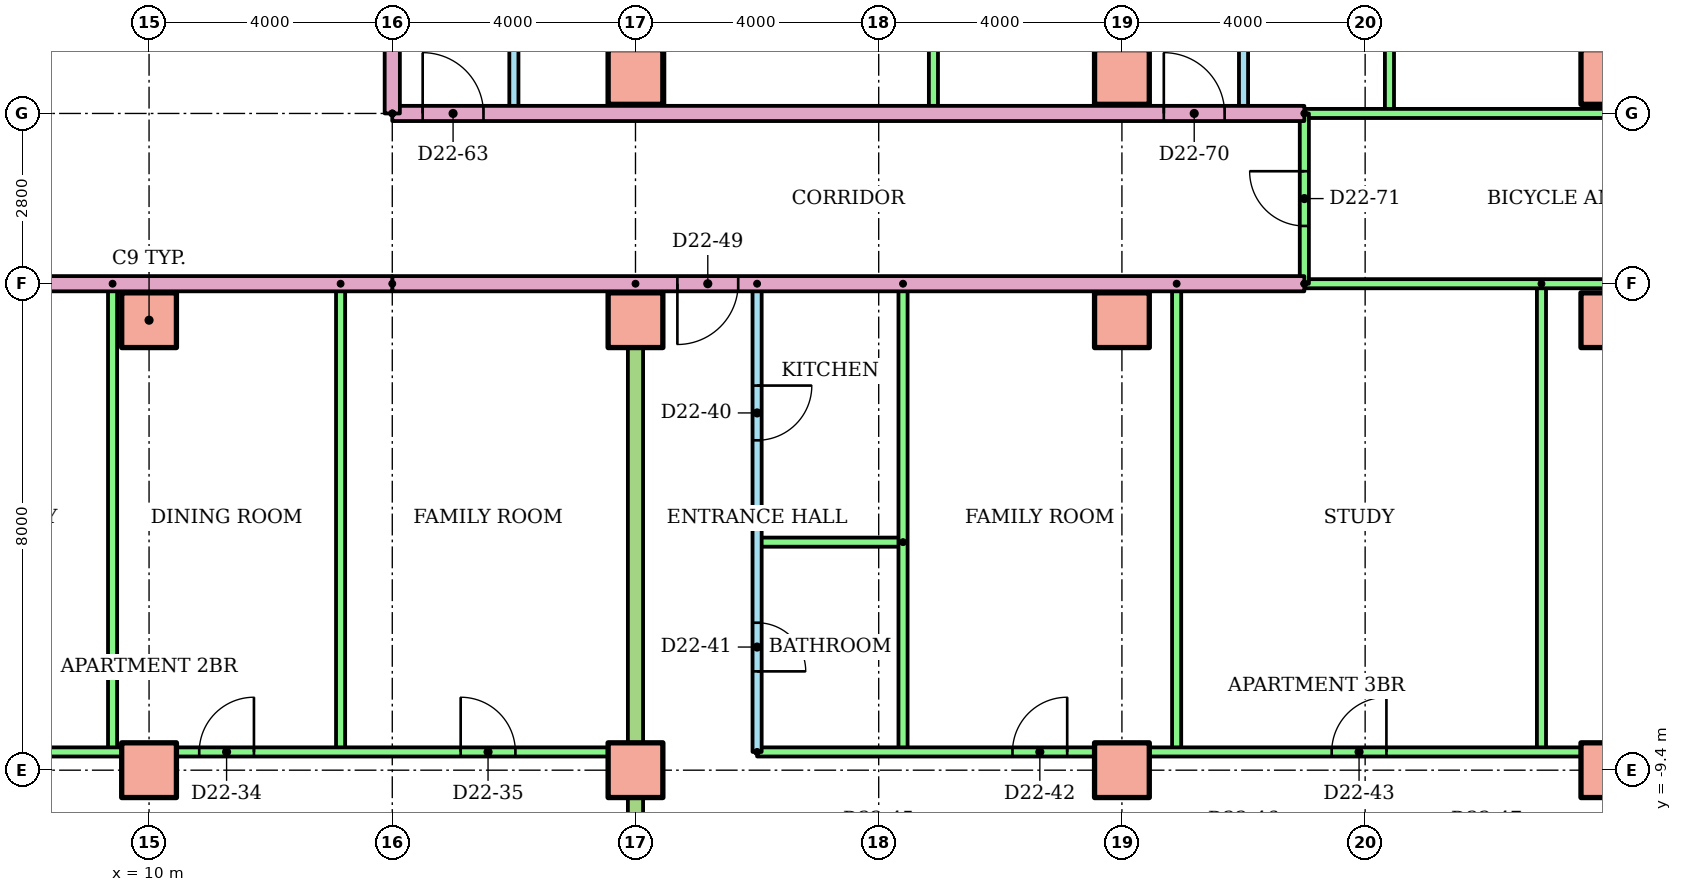
"""IFC4 building model, lengths in metres.
Left out: names, types, materials, properties, quantities, classifications, styles, units other than length and angle.
Written with IfcOpenShell. Run it as: python <this file> out.ifc"""

import sys

from ifc_helpers import new_model, si_unit, direction, frame, frame_2d, origin, origin_2d, place, context, subcontext, project, spatial, rectangle, extrude, element, fill, save


model = new_model("IFC4")
c1 = context("Model", 3, precision=1e-05, world=origin(), true_north=direction((0.0, 1.0)))
c2 = subcontext(c1, "Body", "Model", "MODEL_VIEW")
j1 = project(units=[si_unit("LENGTHUNIT", "METRE"), si_unit("PLANEANGLEUNIT", "RADIAN")], contexts=[c1])
p1 = place(None, origin())
s1 = spatial("IfcSite", under=j1, at=p1, CompositionType="ELEMENT")
p2 = place(p1, origin())
s2 = spatial("IfcBuilding", under=s1, at=p2, CompositionType="ELEMENT")
p3 = place(p2, frame((0.0, 0.0, 87.1)))
s3 = spatial("IfcBuildingStorey", under=s2, at=p3, CompositionType="ELEMENT", Elevation=87.1)
for number, where in (
    (1, (10.0, -9.4, 0.0)),
    (2, (18.0, -9.4, 0.0)),
    (3, (26.0, -9.4, 0.0)),
    (4, (34.0, -9.4, 0.0)),
    (5, (10.0, -2.0, 0.0)),
    (6, (18.0, -2.0, 0.0)),
    (7, (26.0, -2.0, 0.0)),
    (8, (34.0, -2.0, 0.0)),
    (9, (18.0, 2.0, 0.0)),
    (10, (26.0, 2.0, 0.0)),
    (11, (34.0, 2.0, 0.0)),
):
    element("IfcColumn", number, at=place(p3, frame(where)), inside=s3, PredefinedType="COLUMN", context=c2, shape_type="SweptSolid", body=[
        extrude(rectangle(XDim=0.9, YDim=0.9, at=origin_2d()), origin(), (0.0, 0.0, 1.0), 3.2),
    ])
for number, where, z_axis, x_axis in (
    (12, (9.4, -1.4, 0.0), (0.0, 0.0, 1.0), (0.0, -1.0, 0.0)),
    (13, (13.15, -1.4, 0.0), (0.0, 0.0, 1.0), (0.0, -1.0, 0.0)),
):
    element("IfcWall", number, at=place(p3, frame(where, z_axis=z_axis, x_axis=x_axis)), inside=s3, PredefinedType="PARTITIONING", context=c2, shape_type="SweptSolid", body=[
        extrude(rectangle(XDim=7.7, YDim=0.15, at=frame_2d((3.85, 0.0))), origin(), (0.0, 0.0, 1.0), 2.4),
    ])
p4 = place(p3, frame((4.0, -9.1, 0.0)))
e14 = element("IfcWall", 14, at=p4, inside=s3, PredefinedType="PARTITIONING", context=c2, shape_type="SweptSolid", body=[
    extrude(rectangle(XDim=14.0, YDim=0.15, at=frame_2d((7.0, 0.0))), origin(), (0.0, 0.0, 1.0), 2.4),
])
p5 = place(p4, frame((3.45, 0.0, 0.0)))
e15 = element("IfcOpeningElement", 15, at=p5, cuts=e14, PredefinedType="OPENING", context=c2, shape_type="SweptSolid", body=[
    extrude(rectangle(XDim=0.9, YDim=2.1, at=frame_2d((0.45, 1.05))), frame((0.0, 0.085, 0.0), z_axis=(0.0, -1.0, 0.0), x_axis=(1.0, 0.0, 0.0)), (0.0, 0.0, 1.0), 0.17),
])
p6 = place(p4, frame((6.825, 0.0, 0.0)))
e16 = element("IfcOpeningElement", 16, at=p6, cuts=e14, PredefinedType="OPENING", context=c2, shape_type="SweptSolid", body=[
    extrude(rectangle(XDim=0.9, YDim=2.1, at=frame_2d((0.45, 1.05))), frame((0.0, 0.085, 0.0), z_axis=(0.0, -1.0, 0.0), x_axis=(1.0, 0.0, 0.0)), (0.0, 0.0, 1.0), 0.17),
])
p7 = place(p4, frame((11.125, 0.0, 0.0)))
e17 = element("IfcOpeningElement", 17, at=p7, cuts=e14, PredefinedType="OPENING", context=c2, shape_type="SweptSolid", body=[
    extrude(rectangle(XDim=0.9, YDim=2.1, at=frame_2d((0.45, 1.05))), frame((0.0, 0.085, 0.0), z_axis=(0.0, -1.0, 0.0), x_axis=(1.0, 0.0, 0.0)), (0.0, 0.0, 1.0), 0.17),
])
p8 = place(p3, frame((20.0, -1.4, 0.0), z_axis=(0.0, 0.0, 1.0), x_axis=(0.0, -1.0, 0.0)))
e18 = element("IfcWall", 18, at=p8, inside=s3, PredefinedType="PARTITIONING", context=c2, shape_type="SweptSolid", body=[
    extrude(rectangle(XDim=7.7, YDim=0.15, at=frame_2d((3.85, 0.0))), origin(), (0.0, 0.0, 1.0), 2.4),
])
p9 = place(p8, frame((1.675, 0.0, 0.0)))
e19 = element("IfcOpeningElement", 19, at=p9, cuts=e18, PredefinedType="OPENING", context=c2, shape_type="SweptSolid", body=[
    extrude(rectangle(XDim=0.9, YDim=2.1, at=frame_2d((0.45, 1.05))), frame((0.0, 0.085, 0.0), z_axis=(0.0, -1.0, 0.0), x_axis=(1.0, 0.0, 0.0)), (0.0, 0.0, 1.0), 0.17),
])
p10 = place(p8, frame((5.575, 0.0, 0.0)))
e20 = element("IfcOpeningElement", 20, at=p10, cuts=e18, PredefinedType="OPENING", context=c2, shape_type="SweptSolid", body=[
    extrude(rectangle(XDim=0.8, YDim=2.1, at=frame_2d((0.4, 1.05))), frame((0.0, 0.085, 0.0), z_axis=(0.0, -1.0, 0.0), x_axis=(1.0, 0.0, 0.0)), (0.0, 0.0, 1.0), 0.17),
])
p11 = place(p3, frame((22.4, -5.65, 0.0), z_axis=(0.0, 0.0, 1.0), x_axis=(-1.0, 0.0, 0.0)))
e21 = element("IfcWall", 21, at=p11, inside=s3, PredefinedType="PARTITIONING", context=c2, shape_type="SweptSolid", body=[
    extrude(rectangle(XDim=2.4, YDim=0.15, at=frame_2d((1.2, 0.0))), origin(), (0.0, 0.0, 1.0), 2.4),
])
for number, where, z_axis, x_axis in (
    (22, (22.4, -1.4, 0.0), (0.0, 0.0, 1.0), (0.0, -1.0, 0.0)),
    (23, (26.9, -1.4, 0.0), (0.0, 0.0, 1.0), (0.0, -1.0, 0.0)),
    (24, (32.9, -1.4, 0.0), (0.0, 0.0, 1.0), (0.0, -1.0, 0.0)),
):
    element("IfcWall", number, at=place(p3, frame(where, z_axis=z_axis, x_axis=x_axis)), inside=s3, PredefinedType="PARTITIONING", context=c2, shape_type="SweptSolid", body=[
        extrude(rectangle(XDim=7.7, YDim=0.15, at=frame_2d((3.85, 0.0))), origin(), (0.0, 0.0, 1.0), 2.4),
    ])
p12 = place(p3, frame((20.0, -9.1, 0.0)))
e25 = element("IfcWall", 25, at=p12, inside=s3, PredefinedType="PARTITIONING", context=c2, shape_type="SweptSolid", body=[
    extrude(rectangle(XDim=20.62, YDim=0.15, at=frame_2d((10.31, 0.0))), origin(), (0.0, 0.0, 1.0), 2.4),
])
p13 = place(p12, frame((4.2, 0.0, 0.0)))
e26 = element("IfcOpeningElement", 26, at=p13, cuts=e25, PredefinedType="OPENING", context=c2, shape_type="SweptSolid", body=[
    extrude(rectangle(XDim=0.9, YDim=2.1, at=frame_2d((0.45, 1.05))), frame((0.0, 0.085, 0.0), z_axis=(0.0, -1.0, 0.0), x_axis=(1.0, 0.0, 0.0)), (0.0, 0.0, 1.0), 0.17),
])
p14 = place(p12, frame((9.45, 0.0, 0.0)))
e27 = element("IfcOpeningElement", 27, at=p14, cuts=e25, PredefinedType="OPENING", context=c2, shape_type="SweptSolid", body=[
    extrude(rectangle(XDim=0.9, YDim=2.1, at=frame_2d((0.45, 1.05))), frame((0.0, 0.085, 0.0), z_axis=(0.0, -1.0, 0.0), x_axis=(1.0, 0.0, 0.0)), (0.0, 0.0, 1.0), 0.17),
])
p15 = place(p12, frame((16.2, 0.0, 0.0)))
e28 = element("IfcOpeningElement", 28, at=p15, cuts=e25, PredefinedType="OPENING", context=c2, shape_type="SweptSolid", body=[
    extrude(rectangle(XDim=0.9, YDim=2.1, at=frame_2d((0.45, 1.05))), frame((0.0, 0.085, 0.0), z_axis=(0.0, -1.0, 0.0), x_axis=(1.0, 0.0, 0.0)), (0.0, 0.0, 1.0), 0.17),
])
p16 = place(p3, frame((18.0, -1.4, 0.0), z_axis=(0.0, 0.0, 1.0), x_axis=(0.0, -1.0, 0.0)))
e29 = element("IfcWall", 29, at=p16, inside=s3, PredefinedType="PARTITIONING", context=c2, shape_type="SweptSolid", body=[
    extrude(rectangle(XDim=14.81, YDim=0.25, at=frame_2d((7.405, 0.0))), origin(), (0.0, 0.0, 1.0), 2.4),
])
p17 = place(p3, frame((29.0, -1.4, 0.0), z_axis=(0.0, 0.0, 1.0), x_axis=(-1.0, 0.0, 0.0)))
e30 = element("IfcWall", 30, at=p17, inside=s3, PredefinedType="PARTITIONING", context=c2, shape_type="SweptSolid", body=[
    extrude(rectangle(XDim=15.0, YDim=0.25, at=frame_2d((7.5, 0.0))), origin(), (0.0, 0.0, 1.0), 2.4),
])
p18 = place(p17, frame((9.311, 0.0, 0.0)))
e31 = element("IfcOpeningElement", 31, at=p18, cuts=e30, PredefinedType="OPENING", context=c2, shape_type="SweptSolid", body=[
    extrude(rectangle(XDim=1.0, YDim=2.1, at=frame_2d((0.5, 1.05))), frame((0.0, 0.135, 0.0), z_axis=(0.0, -1.0, 0.0), x_axis=(1.0, 0.0, 0.0)), (0.0, 0.0, 1.0), 0.27),
])
p19 = place(p3, frame((40.62, -1.4, 0.0), z_axis=(0.0, 0.0, 1.0), x_axis=(-1.0, 0.0, 0.0)))
e32 = element("IfcWall", 32, at=p19, inside=s3, PredefinedType="PARTITIONING", context=c2, shape_type="SweptSolid", body=[
    extrude(rectangle(XDim=11.62, YDim=0.15, at=frame_2d((5.81, 0.0))), origin(), (0.0, 0.0, 1.0), 2.4),
])
p20 = place(p3, frame((16.0, 11.5, 0.0), z_axis=(0.0, 0.0, 1.0), x_axis=(0.0, -1.0, 0.0)))
e33 = element("IfcWall", 33, at=p20, inside=s3, PredefinedType="PARTITIONING", context=c2, shape_type="SweptSolid", body=[
    extrude(rectangle(XDim=10.1, YDim=0.15, at=frame_2d((5.05, 0.0))), origin(), (0.0, 0.0, 1.0), 2.4),
])
p21 = place(p20, frame((6.9, 0.0, 0.0)))
e34 = element("IfcOpeningElement", 34, at=p21, cuts=e33, PredefinedType="OPENING", context=c2, shape_type="SweptSolid", body=[
    extrude(rectangle(XDim=0.9, YDim=2.1, at=frame_2d((0.45, 1.05))), frame((0.0, 0.085, 0.0), z_axis=(0.0, -1.0, 0.0), x_axis=(1.0, 0.0, 0.0)), (0.0, 0.0, 1.0), 0.17),
])
p22 = place(p20, frame((1.9, 0.0, 0.0)))
e35 = element("IfcOpeningElement", 35, at=p22, cuts=e33, PredefinedType="OPENING", context=c2, shape_type="SweptSolid", body=[
    extrude(rectangle(XDim=0.8, YDim=2.1, at=frame_2d((0.4, 1.05))), frame((0.0, 0.085, 0.0), z_axis=(0.0, -1.0, 0.0), x_axis=(1.0, 0.0, 0.0)), (0.0, 0.0, 1.0), 0.17),
])
for number, where, z_axis, x_axis in (
    (36, (18.4, 11.5, 0.0), (0.0, 0.0, 1.0), (0.0, -1.0, 0.0)),
    (37, (22.9, 11.5, 0.0), (0.0, 0.0, 1.0), (0.0, -1.0, 0.0)),
):
    element("IfcWall", number, at=place(p3, frame(where, z_axis=z_axis, x_axis=x_axis)), inside=s3, PredefinedType="PARTITIONING", context=c2, shape_type="SweptSolid", body=[
        extrude(rectangle(XDim=10.1, YDim=0.15, at=frame_2d((5.05, 0.0))), origin(), (0.0, 0.0, 1.0), 2.4),
    ])
p23 = place(p3, frame((28.0, 11.5, 0.0), z_axis=(0.0, 0.0, 1.0), x_axis=(0.0, -1.0, 0.0)))
e38 = element("IfcWall", 38, at=p23, inside=s3, PredefinedType="PARTITIONING", context=c2, shape_type="SweptSolid", body=[
    extrude(rectangle(XDim=10.1, YDim=0.15, at=frame_2d((5.05, 0.0))), origin(), (0.0, 0.0, 1.0), 2.4),
])
p24 = place(p23, frame((6.9, 0.0, 0.0)))
e39 = element("IfcOpeningElement", 39, at=p24, cuts=e38, PredefinedType="OPENING", context=c2, shape_type="SweptSolid", body=[
    extrude(rectangle(XDim=0.9, YDim=2.1, at=frame_2d((0.45, 1.05))), frame((0.0, 0.085, 0.0), z_axis=(0.0, -1.0, 0.0), x_axis=(1.0, 0.0, 0.0)), (0.0, 0.0, 1.0), 0.17),
])
p25 = place(p23, frame((1.9, 0.0, 0.0)))
e40 = element("IfcOpeningElement", 40, at=p25, cuts=e38, PredefinedType="OPENING", context=c2, shape_type="SweptSolid", body=[
    extrude(rectangle(XDim=0.8, YDim=2.1, at=frame_2d((0.4, 1.05))), frame((0.0, 0.085, 0.0), z_axis=(0.0, -1.0, 0.0), x_axis=(1.0, 0.0, 0.0)), (0.0, 0.0, 1.0), 0.17),
])
p26 = place(p3, frame((30.4, 11.5, 0.0), z_axis=(0.0, 0.0, 1.0), x_axis=(0.0, -1.0, 0.0)))
e41 = element("IfcWall", 41, at=p26, inside=s3, PredefinedType="PARTITIONING", context=c2, shape_type="SweptSolid", body=[
    extrude(rectangle(XDim=10.1, YDim=0.15, at=frame_2d((5.05, 0.0))), origin(), (0.0, 0.0, 1.0), 2.4),
])
p27 = place(p3, frame((26.0, 18.621, 0.0), z_axis=(0.0, 0.0, 1.0), x_axis=(0.0, -1.0, 0.0)))
e42 = element("IfcWall", 42, at=p27, inside=s3, PredefinedType="PARTITIONING", context=c2, shape_type="SweptSolid", body=[
    extrude(rectangle(XDim=17.221, YDim=0.25, at=frame_2d((8.611, 0.0))), origin(), (0.0, 0.0, 1.0), 2.4),
])
p28 = place(p3, frame((14.0, 1.4, 0.0)))
e43 = element("IfcWall", 43, at=p28, inside=s3, PredefinedType="PARTITIONING", context=c2, shape_type="SweptSolid", body=[
    extrude(rectangle(XDim=15.0, YDim=0.25, at=frame_2d((7.5, 0.0))), origin(), (0.0, 0.0, 1.0), 2.4),
])
p29 = place(p28, frame((0.5, 0.0, 0.0)))
e44 = element("IfcOpeningElement", 44, at=p29, cuts=e43, PredefinedType="OPENING", context=c2, shape_type="SweptSolid", body=[
    extrude(rectangle(XDim=1.0, YDim=2.1, at=frame_2d((0.5, 1.05))), frame((0.0, 0.135, 0.0), z_axis=(0.0, -1.0, 0.0), x_axis=(1.0, 0.0, 0.0)), (0.0, 0.0, 1.0), 0.27),
])
p30 = place(p28, frame((12.689, 0.0, 0.0)))
e45 = element("IfcOpeningElement", 45, at=p30, cuts=e43, PredefinedType="OPENING", context=c2, shape_type="SweptSolid", body=[
    extrude(rectangle(XDim=1.0, YDim=2.1, at=frame_2d((0.5, 1.05))), frame((0.0, 0.135, 0.0), z_axis=(0.0, -1.0, 0.0), x_axis=(1.0, 0.0, 0.0)), (0.0, 0.0, 1.0), 0.27),
])
p31 = place(p3, frame((29.0, 1.4, 0.0)))
e46 = element("IfcWall", 46, at=p31, inside=s3, PredefinedType="PARTITIONING", context=c2, shape_type="SweptSolid", body=[
    extrude(rectangle(XDim=11.62, YDim=0.15, at=frame_2d((5.81, 0.0))), origin(), (0.0, 0.0, 1.0), 2.4),
])
p32 = place(p3, frame((29.0, -1.4, 0.0), z_axis=(0.0, 0.0, 1.0), x_axis=(0.0, 1.0, 0.0)))
e47 = element("IfcWall", 47, at=p32, inside=s3, PredefinedType="PARTITIONING", context=c2, shape_type="SweptSolid", body=[
    extrude(rectangle(XDim=2.8, YDim=0.15, at=frame_2d((1.4, 0.0))), origin(), (0.0, 0.0, 1.0), 2.4),
])
p33 = place(p32, frame((0.95, 0.0, 0.0)))
e48 = element("IfcOpeningElement", 48, at=p33, cuts=e47, PredefinedType="OPENING", context=c2, shape_type="SweptSolid", body=[
    extrude(rectangle(XDim=0.9, YDim=2.1, at=frame_2d((0.45, 1.05))), frame((0.0, 0.085, 0.0), z_axis=(0.0, -1.0, 0.0), x_axis=(1.0, 0.0, 0.0)), (0.0, 0.0, 1.0), 0.17),
])
p34 = place(p3, frame((14.0, -1.4, 0.0), z_axis=(0.0, 0.0, 1.0), x_axis=(-1.0, 0.0, 0.0)))
e49 = element("IfcWall", 49, at=p34, inside=s3, PredefinedType="PARTITIONING", context=c2, shape_type="SweptSolid", body=[
    extrude(rectangle(XDim=28.0, YDim=0.25, at=frame_2d((14.0, 0.0))), origin(), (0.0, 0.0, 1.0), 2.4),
])
p35 = place(p34, frame((12.689, 0.0, 0.0)))
e50 = element("IfcOpeningElement", 50, at=p35, cuts=e49, PredefinedType="OPENING", context=c2, shape_type="SweptSolid", body=[
    extrude(rectangle(XDim=1.0, YDim=2.1, at=frame_2d((0.5, 1.05))), frame((0.0, 0.135, 0.0), z_axis=(0.0, -1.0, 0.0), x_axis=(1.0, 0.0, 0.0)), (0.0, 0.0, 1.0), 0.27),
])
p36 = place(p34, frame((10.311, 0.0, 0.0)))
e51 = element("IfcOpeningElement", 51, at=p36, cuts=e49, PredefinedType="OPENING", context=c2, shape_type="SweptSolid", body=[
    extrude(rectangle(XDim=1.0, YDim=2.1, at=frame_2d((0.5, 1.05))), frame((0.0, 0.135, 0.0), z_axis=(0.0, -1.0, 0.0), x_axis=(1.0, 0.0, 0.0)), (0.0, 0.0, 1.0), 0.27),
])
p37 = place(p3, frame((14.0, 1.4, 0.0), z_axis=(0.0, 0.0, 1.0), x_axis=(0.0, 1.0, 0.0)))
e52 = element("IfcWall", 52, at=p37, inside=s3, PredefinedType="PARTITIONING", context=c2, shape_type="SweptSolid", body=[
    extrude(rectangle(XDim=1.6, YDim=0.25, at=frame_2d((0.8, 0.0))), origin(), (0.0, 0.0, 1.0), 2.4),
])
p38 = place(p6, origin())
e53 = element("IfcDoor", 53, at=p38, inside=s3, OperationType="SINGLE_SWING_RIGHT", PredefinedType="DOOR", context=c2, shape_type="SweptSolid", body=[
    extrude(rectangle(XDim=0.9, YDim=2.1, at=frame_2d((0.45, 1.05))), frame((0.0, 0.025, 0.0), z_axis=(0.0, -1.0, 0.0), x_axis=(1.0, 0.0, 0.0)), (0.0, 0.0, 1.0), 0.05),
])
fill(e16, e53)
p39 = place(p7, origin())
e54 = element("IfcDoor", 54, at=p39, inside=s3, OperationType="SINGLE_SWING_LEFT", PredefinedType="DOOR", context=c2, shape_type="SweptSolid", body=[
    extrude(rectangle(XDim=0.9, YDim=2.1, at=frame_2d((0.45, 1.05))), frame((0.0, 0.025, 0.0), z_axis=(0.0, -1.0, 0.0), x_axis=(1.0, 0.0, 0.0)), (0.0, 0.0, 1.0), 0.05),
])
fill(e17, e54)
p40 = place(p9, origin())
e55 = element("IfcDoor", 55, at=p40, inside=s3, OperationType="SINGLE_SWING_LEFT", PredefinedType="DOOR", context=c2, shape_type="SweptSolid", body=[
    extrude(rectangle(XDim=0.9, YDim=2.1, at=frame_2d((0.45, 1.05))), frame((0.0, 0.025, 0.0), z_axis=(0.0, -1.0, 0.0), x_axis=(1.0, 0.0, 0.0)), (0.0, 0.0, 1.0), 0.05),
])
fill(e19, e55)
p41 = place(p10, origin())
e56 = element("IfcDoor", 56, at=p41, inside=s3, OperationType="SINGLE_SWING_RIGHT", PredefinedType="DOOR", context=c2, shape_type="SweptSolid", body=[
    extrude(rectangle(XDim=0.8, YDim=2.1, at=frame_2d((0.4, 1.05))), frame((0.0, 0.025, 0.0), z_axis=(0.0, -1.0, 0.0), x_axis=(1.0, 0.0, 0.0)), (0.0, 0.0, 1.0), 0.05),
])
fill(e20, e56)
p42 = place(p13, origin())
e57 = element("IfcDoor", 57, at=p42, inside=s3, OperationType="SINGLE_SWING_RIGHT", PredefinedType="DOOR", context=c2, shape_type="SweptSolid", body=[
    extrude(rectangle(XDim=0.9, YDim=2.1, at=frame_2d((0.45, 1.05))), frame((0.0, 0.025, 0.0), z_axis=(0.0, -1.0, 0.0), x_axis=(1.0, 0.0, 0.0)), (0.0, 0.0, 1.0), 0.05),
])
fill(e26, e57)
p43 = place(p14, origin())
e58 = element("IfcDoor", 58, at=p43, inside=s3, OperationType="SINGLE_SWING_RIGHT", PredefinedType="DOOR", context=c2, shape_type="SweptSolid", body=[
    extrude(rectangle(XDim=0.9, YDim=2.1, at=frame_2d((0.45, 1.05))), frame((0.0, 0.025, 0.0), z_axis=(0.0, -1.0, 0.0), x_axis=(1.0, 0.0, 0.0)), (0.0, 0.0, 1.0), 0.05),
])
fill(e27, e58)
p44 = place(p18, origin())
e59 = element("IfcDoor", 59, at=p44, inside=s3, OperationType="SINGLE_SWING_RIGHT", PredefinedType="DOOR", context=c2, shape_type="SweptSolid", body=[
    extrude(rectangle(XDim=1.0, YDim=2.1, at=frame_2d((0.5, 1.05))), frame((0.0, 0.025, 0.0), z_axis=(0.0, -1.0, 0.0), x_axis=(1.0, 0.0, 0.0)), (0.0, 0.0, 1.0), 0.05),
])
fill(e31, e59)
p45 = place(p29, origin())
e60 = element("IfcDoor", 60, at=p45, inside=s3, OperationType="SINGLE_SWING_LEFT", PredefinedType="DOOR", context=c2, shape_type="SweptSolid", body=[
    extrude(rectangle(XDim=1.0, YDim=2.1, at=frame_2d((0.5, 1.05))), frame((0.0, 0.025, 0.0), z_axis=(0.0, -1.0, 0.0), x_axis=(1.0, 0.0, 0.0)), (0.0, 0.0, 1.0), 0.05),
])
fill(e44, e60)
p46 = place(p30, origin())
e61 = element("IfcDoor", 61, at=p46, inside=s3, OperationType="SINGLE_SWING_LEFT", PredefinedType="DOOR", context=c2, shape_type="SweptSolid", body=[
    extrude(rectangle(XDim=1.0, YDim=2.1, at=frame_2d((0.5, 1.05))), frame((0.0, 0.025, 0.0), z_axis=(0.0, -1.0, 0.0), x_axis=(1.0, 0.0, 0.0)), (0.0, 0.0, 1.0), 0.05),
])
fill(e45, e61)
p47 = place(p33, origin())
e62 = element("IfcDoor", 62, at=p47, inside=s3, OperationType="SINGLE_SWING_RIGHT", PredefinedType="DOOR", context=c2, shape_type="SweptSolid", body=[
    extrude(rectangle(XDim=0.9, YDim=2.1, at=frame_2d((0.45, 1.05))), frame((0.0, 0.025, 0.0), z_axis=(0.0, -1.0, 0.0), x_axis=(1.0, 0.0, 0.0)), (0.0, 0.0, 1.0), 0.05),
])
fill(e48, e62)
save(model, sys.argv[1])
